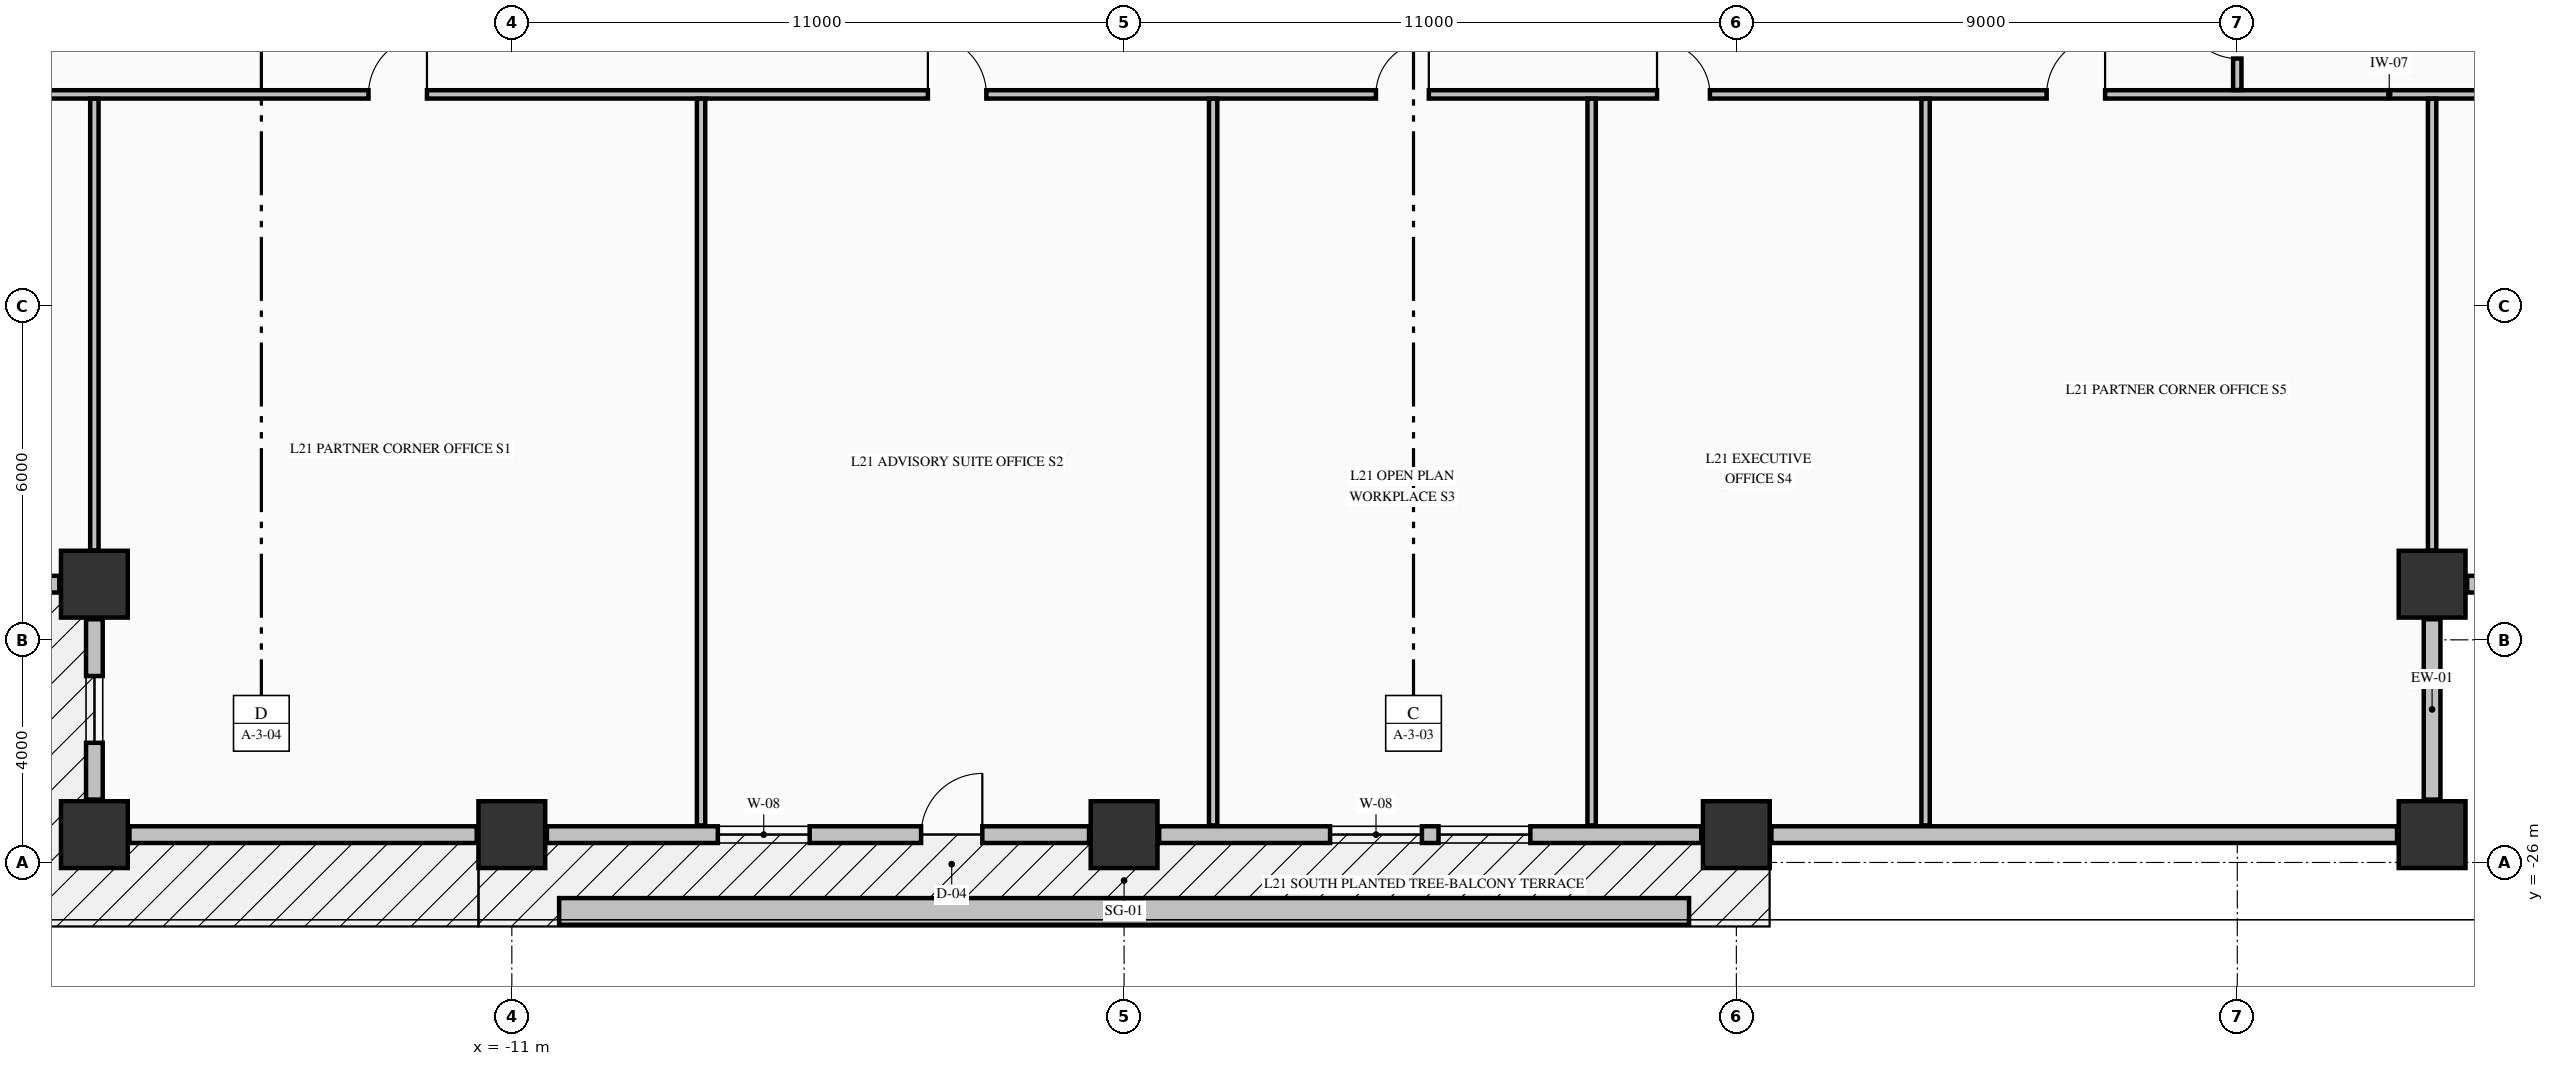
"""IFC4 building model, lengths in metres.
Left out: names, types, materials, properties, quantities, classifications, styles, units other than length and angle.
Written with IfcOpenShell. Run it as: python <this file> out.ifc"""

import sys

from ifc_helpers import new_model, si_unit, direction, frame, frame_2d, origin, origin_2d, place, context, subcontext, project, spatial, rectangle, extrude, element, fill, save


model = new_model("IFC4")
c1 = context("Model", 3, precision=1e-05, world=origin(), true_north=direction((0.0, 1.0)))
c2 = subcontext(c1, "Body", "Model", "MODEL_VIEW")
j1 = project(units=[si_unit("LENGTHUNIT", "METRE"), si_unit("PLANEANGLEUNIT", "RADIAN")], contexts=[c1])
p1 = place(None, origin())
s1 = spatial("IfcSite", under=j1, at=p1, CompositionType="ELEMENT")
p2 = place(p1, origin())
s2 = spatial("IfcBuilding", under=s1, at=p2, CompositionType="ELEMENT")
p3 = place(p2, frame((0.0, 0.0, 86.94)))
s3 = spatial("IfcBuildingStorey", under=s2, at=p3, CompositionType="ELEMENT", Elevation=86.94)
for number, where, z_axis, x_axis in (
    (1, (-18.5, -25.5, -0.425), (0.0, 0.0, 1.0), (1.0, 0.0, 0.0)),
    (2, (-11.0, -25.5, -0.425), (0.0, 0.0, 1.0), (1.0, 0.0, 0.0)),
    (3, (0.0, -25.5, -0.425), (0.0, 0.0, 1.0), (1.0, 0.0, 0.0)),
    (4, (11.0, -25.5, -0.425), (0.0, 0.0, 1.0), (1.0, 0.0, 0.0)),
    (5, (23.5, -25.5, -0.425), (0.0, 0.0, 1.0), (1.0, 0.0, 0.0)),
    (6, (-18.5, -21.0, -0.425), (0.0, 0.0, 1.0), (1.0, 0.0, 0.0)),
    (7, (23.5, -21.0, -0.425), (0.0, 0.0, 1.0), (1.0, 0.0, 0.0)),
):
    element("IfcColumn", number, at=place(p3, frame(where, z_axis=z_axis, x_axis=x_axis)), inside=s3, PredefinedType="COLUMN", context=c2, shape_type="SweptSolid", body=[
        extrude(rectangle(XDim=1.2, YDim=1.2, at=origin_2d()), origin(), (0.0, 0.0, 1.0), 4.595),
    ])
for number, where, z_axis, x_axis in (
    (8, (23.5, -24.87, 0.0), (0.0, 0.0, 1.0), (0.0, 1.0, 0.0)),
    (9, (24.13, -21.0, 0.0), (0.0, 0.0, 1.0), (1.0, 0.0, 0.0)),
):
    element("IfcWall", number, at=place(p3, frame(where, z_axis=z_axis, x_axis=x_axis)), inside=s3, PredefinedType="STANDARD", context=c2, shape_type="SweptSolid", body=[
        extrude(rectangle(XDim=3.24, YDim=0.3, at=frame_2d((1.62, 0.0))), origin(), (0.0, 0.0, 1.0), 2.362),
    ])
p4 = place(p3, frame((-22.37, -21.0, 0.0), z_axis=(0.0, 0.0, 1.0), x_axis=(1.0, 0.0, 0.0)))
e10 = element("IfcWall", 10, at=p4, inside=s3, PredefinedType="STANDARD", context=c2, shape_type="SweptSolid", body=[
    extrude(rectangle(XDim=3.24, YDim=0.3, at=frame_2d((1.62, 0.0))), origin(), (0.0, 0.0, 1.0), 3.562),
])
p5 = place(p4, frame((1.02, 0.0, 0.82)))
e11 = element("IfcOpeningElement", 11, at=p5, cuts=e10, PredefinedType="OPENING", context=c2, shape_type="SweptSolid", body=[
    extrude(rectangle(XDim=1.2, YDim=1.65, at=frame_2d((0.6, 0.825))), frame((0.0, 0.16, 0.0), z_axis=(0.0, -1.0, 0.0), x_axis=(1.0, 0.0, 0.0)), (0.0, 0.0, 1.0), 0.32),
])
p6 = place(p3, frame((-18.5, -21.63, 0.0), z_axis=(0.0, 0.0, 1.0), x_axis=(0.0, -1.0, 0.0)))
e12 = element("IfcWall", 12, at=p6, inside=s3, PredefinedType="STANDARD", context=c2, shape_type="SweptSolid", body=[
    extrude(rectangle(XDim=3.24, YDim=0.3, at=frame_2d((1.62, 0.0))), origin(), (0.0, 0.0, 1.0), 3.562),
])
p7 = place(p6, frame((1.02, 0.0, 0.82)))
e13 = element("IfcOpeningElement", 13, at=p7, cuts=e12, PredefinedType="OPENING", context=c2, shape_type="SweptSolid", body=[
    extrude(rectangle(XDim=1.2, YDim=1.65, at=frame_2d((0.6, 0.825))), frame((0.0, 0.16, 0.0), z_axis=(0.0, -1.0, 0.0), x_axis=(1.0, 0.0, 0.0)), (0.0, 0.0, 1.0), 0.32),
])
p8 = place(p3, frame((-17.87, -25.5, 0.0), z_axis=(0.0, 0.0, 1.0), x_axis=(1.0, 0.0, 0.0)))
e14 = element("IfcWall", 14, at=p8, inside=s3, PredefinedType="STANDARD", context=c2, shape_type="SweptSolid", body=[
    extrude(rectangle(XDim=6.24, YDim=0.3, at=frame_2d((3.12, 0.0))), origin(), (0.0, 0.0, 1.0), 3.562),
])
p9 = place(p3, frame((-10.37, -25.5, 0.0), z_axis=(0.0, 0.0, 1.0), x_axis=(1.0, 0.0, 0.0)))
e15 = element("IfcWall", 15, at=p9, inside=s3, PredefinedType="STANDARD", context=c2, shape_type="SweptSolid", body=[
    extrude(rectangle(XDim=9.74, YDim=0.3, at=frame_2d((4.87, 0.0))), origin(), (0.0, 0.0, 1.0), 3.562),
])
p10 = place(p9, frame((6.723, 0.0, 0.0)))
e16 = element("IfcOpeningElement", 16, at=p10, cuts=e15, PredefinedType="OPENING", context=c2, shape_type="SweptSolid", body=[
    extrude(rectangle(XDim=1.1, YDim=2.15, at=frame_2d((0.55, 1.075))), frame((0.0, 0.16, 0.0), z_axis=(0.0, -1.0, 0.0), x_axis=(1.0, 0.0, 0.0)), (0.0, 0.0, 1.0), 0.32),
])
p11 = place(p9, frame((3.071, 0.0, 0.8)))
e17 = element("IfcOpeningElement", 17, at=p11, cuts=e15, PredefinedType="OPENING", context=c2, shape_type="SweptSolid", body=[
    extrude(rectangle(XDim=1.65, YDim=1.7, at=frame_2d((0.825, 0.85))), frame((0.0, 0.16, 0.0), z_axis=(0.0, -1.0, 0.0), x_axis=(1.0, 0.0, 0.0)), (0.0, 0.0, 1.0), 0.32),
])
p12 = place(p3, frame((0.63, -25.5, 0.0), z_axis=(0.0, 0.0, 1.0), x_axis=(1.0, 0.0, 0.0)))
e18 = element("IfcWall", 18, at=p12, inside=s3, PredefinedType="STANDARD", context=c2, shape_type="SweptSolid", body=[
    extrude(rectangle(XDim=9.74, YDim=0.3, at=frame_2d((4.87, 0.0))), origin(), (0.0, 0.0, 1.0), 3.562),
])
p13 = place(p12, frame((3.071, 0.0, 0.8)))
e19 = element("IfcOpeningElement", 19, at=p13, cuts=e18, PredefinedType="OPENING", context=c2, shape_type="SweptSolid", body=[
    extrude(rectangle(XDim=1.65, YDim=1.7, at=frame_2d((0.825, 0.85))), frame((0.0, 0.16, 0.0), z_axis=(0.0, -1.0, 0.0), x_axis=(1.0, 0.0, 0.0)), (0.0, 0.0, 1.0), 0.32),
])
p14 = place(p12, frame((5.019, 0.0, 0.8)))
e20 = element("IfcOpeningElement", 20, at=p14, cuts=e18, PredefinedType="OPENING", context=c2, shape_type="SweptSolid", body=[
    extrude(rectangle(XDim=1.65, YDim=1.7, at=frame_2d((0.825, 0.85))), frame((0.0, 0.16, 0.0), z_axis=(0.0, -1.0, 0.0), x_axis=(1.0, 0.0, 0.0)), (0.0, 0.0, 1.0), 0.32),
])
p15 = place(p3, frame((11.63, -25.5, 0.0), z_axis=(0.0, 0.0, 1.0), x_axis=(1.0, 0.0, 0.0)))
e21 = element("IfcWall", 21, at=p15, inside=s3, PredefinedType="STANDARD", context=c2, shape_type="SweptSolid", body=[
    extrude(rectangle(XDim=11.24, YDim=0.3, at=frame_2d((5.62, 0.0))), origin(), (0.0, 0.0, 1.0), 1.962),
])
p16 = place(p3, frame((-22.835, -12.2, 0.0), z_axis=(0.0, 0.0, 1.0), x_axis=(1.0, 0.0, 0.0)))
e22 = element("IfcWall", 22, at=p16, inside=s3, PredefinedType="PARTITIONING", context=c2, shape_type="SweptSolid", body=[
    extrude(rectangle(XDim=50.67, YDim=0.15, at=frame_2d((25.335, 0.0))), origin(), (0.0, 0.0, 1.0), 4.17),
])
p17 = place(p16, frame((9.26, 0.0, 0.0)))
e23 = element("IfcOpeningElement", 23, at=p17, cuts=e22, PredefinedType="OPENING", context=c2, shape_type="SweptSolid", body=[
    extrude(rectangle(XDim=1.05, YDim=2.15, at=frame_2d((0.525, 1.075))), frame((0.0, 0.085, 0.0), z_axis=(0.0, -1.0, 0.0), x_axis=(1.0, 0.0, 0.0)), (0.0, 0.0, 1.0), 0.17),
])
p18 = place(p16, frame((19.31, 0.0, 0.0)))
e24 = element("IfcOpeningElement", 24, at=p18, cuts=e22, PredefinedType="OPENING", context=c2, shape_type="SweptSolid", body=[
    extrude(rectangle(XDim=1.05, YDim=2.15, at=frame_2d((0.525, 1.075))), frame((0.0, 0.085, 0.0), z_axis=(0.0, -1.0, 0.0), x_axis=(1.0, 0.0, 0.0)), (0.0, 0.0, 1.0), 0.17),
])
p19 = place(p16, frame((27.36, 0.0, 0.0)))
e25 = element("IfcOpeningElement", 25, at=p19, cuts=e22, PredefinedType="OPENING", context=c2, shape_type="SweptSolid", body=[
    extrude(rectangle(XDim=0.95, YDim=2.15, at=frame_2d((0.475, 1.075))), frame((0.0, 0.085, 0.0), z_axis=(0.0, -1.0, 0.0), x_axis=(1.0, 0.0, 0.0)), (0.0, 0.0, 1.0), 0.17),
])
p20 = place(p16, frame((32.41, 0.0, 0.0)))
e26 = element("IfcOpeningElement", 26, at=p20, cuts=e22, PredefinedType="OPENING", context=c2, shape_type="SweptSolid", body=[
    extrude(rectangle(XDim=0.95, YDim=2.15, at=frame_2d((0.475, 1.075))), frame((0.0, 0.085, 0.0), z_axis=(0.0, -1.0, 0.0), x_axis=(1.0, 0.0, 0.0)), (0.0, 0.0, 1.0), 0.17),
])
p21 = place(p16, frame((39.41, 0.0, 0.0)))
e27 = element("IfcOpeningElement", 27, at=p21, cuts=e22, PredefinedType="OPENING", context=c2, shape_type="SweptSolid", body=[
    extrude(rectangle(XDim=1.05, YDim=2.15, at=frame_2d((0.525, 1.075))), frame((0.0, 0.085, 0.0), z_axis=(0.0, -1.0, 0.0), x_axis=(1.0, 0.0, 0.0)), (0.0, 0.0, 1.0), 0.17),
])
p22 = place(p3, frame((-18.5, -20.394, 0.0), z_axis=(0.0, 0.0, 1.0), x_axis=(0.0, 1.0, 0.0)))
e28 = element("IfcWall", 28, at=p22, inside=s3, PredefinedType="PARTITIONING", context=c2, shape_type="SweptSolid", body=[
    extrude(rectangle(XDim=8.116, YDim=0.15, at=frame_2d((4.058, 0.0))), origin(), (0.0, 0.0, 1.0), 4.17),
])
for number, where, z_axis, x_axis in (
    (29, (-7.6, -25.335, 0.0), (0.0, 0.0, 1.0), (0.0, 1.0, 0.0)),
    (30, (1.6, -25.335, 0.0), (0.0, 0.0, 1.0), (0.0, 1.0, 0.0)),
    (31, (8.4, -25.335, 0.0), (0.0, 0.0, 1.0), (0.0, 1.0, 0.0)),
    (32, (14.4, -25.335, 0.0), (0.0, 0.0, 1.0), (0.0, 1.0, 0.0)),
):
    element("IfcWall", number, at=place(p3, frame(where, z_axis=z_axis, x_axis=x_axis)), inside=s3, PredefinedType="PARTITIONING", context=c2, shape_type="SweptSolid", body=[
        extrude(rectangle(XDim=13.057, YDim=0.15, at=frame_2d((6.528, 0.0))), origin(), (0.0, 0.0, 1.0), 4.17),
    ])
p23 = place(p3, frame((20.0, -12.122, 0.0), z_axis=(0.0, 0.0, 1.0), x_axis=(0.0, 1.0, 0.0)))
e33 = element("IfcWall", 33, at=p23, inside=s3, PredefinedType="PARTITIONING", context=c2, shape_type="SweptSolid", body=[
    extrude(rectangle(XDim=1.666, YDim=0.15, at=frame_2d((0.833, 0.0))), origin(), (0.0, 0.0, 1.0), 3.36),
])
p24 = place(p23, frame((0.566, 0.0, 0.0)))
e34 = element("IfcOpeningElement", 34, at=p24, cuts=e33, PredefinedType="OPENING", context=c2, shape_type="SweptSolid", body=[
    extrude(rectangle(XDim=0.95, YDim=2.15, at=frame_2d((0.475, 1.075))), frame((0.0, 0.085, 0.0), z_axis=(0.0, -1.0, 0.0), x_axis=(1.0, 0.0, 0.0)), (0.0, 0.0, 1.0), 0.17),
])
p25 = place(p3, frame((23.5, -20.394, 0.0), z_axis=(0.0, 0.0, 1.0), x_axis=(0.0, 1.0, 0.0)))
e35 = element("IfcWall", 35, at=p25, inside=s3, PredefinedType="PARTITIONING", context=c2, shape_type="SweptSolid", body=[
    extrude(rectangle(XDim=8.116, YDim=0.15, at=frame_2d((4.058, 0.0))), origin(), (0.0, 0.0, 1.0), 4.17),
])
p26 = place(p3, frame((-10.15, -26.88, -0.04), z_axis=(0.0, 0.0, 1.0), x_axis=(1.0, 0.0, 0.0)))
e36 = element("IfcWall", 36, at=p26, inside=s3, PredefinedType="PARAPET", context=c2, shape_type="SweptSolid", body=[
    extrude(rectangle(XDim=20.3, YDim=0.48, at=frame_2d((10.15, 0.0))), origin(), (0.0, 0.0, 1.0), 0.52),
])
p27 = place(p7, origin())
e37 = element("IfcWindow", 37, at=p27, inside=s3, PartitioningType="SINGLE_PANEL", PredefinedType="WINDOW", context=c2, shape_type="SweptSolid", body=[
    extrude(rectangle(XDim=1.2, YDim=1.65, at=frame_2d((0.6, 0.825))), frame((0.0, 0.03, 0.0), z_axis=(0.0, -1.0, 0.0), x_axis=(1.0, 0.0, 0.0)), (0.0, 0.0, 1.0), 0.06),
])
fill(e13, e37)
p28 = place(p10, origin())
e38 = element("IfcDoor", 38, at=p28, inside=s3, OperationType="SINGLE_SWING_RIGHT", PredefinedType="DOOR", context=c2, shape_type="SweptSolid", body=[
    extrude(rectangle(XDim=1.1, YDim=2.15, at=frame_2d((0.55, 1.075))), frame((0.0, 0.025, 0.0), z_axis=(0.0, -1.0, 0.0), x_axis=(1.0, 0.0, 0.0)), (0.0, 0.0, 1.0), 0.05),
])
fill(e16, e38)
p29 = place(p11, origin())
e39 = element("IfcWindow", 39, at=p29, inside=s3, PartitioningType="SINGLE_PANEL", PredefinedType="WINDOW", context=c2, shape_type="SweptSolid", body=[
    extrude(rectangle(XDim=1.65, YDim=1.7, at=frame_2d((0.825, 0.85))), frame((0.0, 0.03, 0.0), z_axis=(0.0, -1.0, 0.0), x_axis=(1.0, 0.0, 0.0)), (0.0, 0.0, 1.0), 0.06),
])
fill(e17, e39)
p30 = place(p13, origin())
e40 = element("IfcWindow", 40, at=p30, inside=s3, PartitioningType="SINGLE_PANEL", PredefinedType="WINDOW", context=c2, shape_type="SweptSolid", body=[
    extrude(rectangle(XDim=1.65, YDim=1.7, at=frame_2d((0.825, 0.85))), frame((0.0, 0.03, 0.0), z_axis=(0.0, -1.0, 0.0), x_axis=(1.0, 0.0, 0.0)), (0.0, 0.0, 1.0), 0.06),
])
fill(e19, e40)
p31 = place(p14, origin())
e41 = element("IfcWindow", 41, at=p31, inside=s3, PartitioningType="SINGLE_PANEL", PredefinedType="WINDOW", context=c2, shape_type="SweptSolid", body=[
    extrude(rectangle(XDim=1.65, YDim=1.7, at=frame_2d((0.825, 0.85))), frame((0.0, 0.03, 0.0), z_axis=(0.0, -1.0, 0.0), x_axis=(1.0, 0.0, 0.0)), (0.0, 0.0, 1.0), 0.06),
])
fill(e20, e41)
p32 = place(p17, origin())
e42 = element("IfcDoor", 42, at=p32, inside=s3, OperationType="SINGLE_SWING_RIGHT", PredefinedType="DOOR", context=c2, shape_type="SweptSolid", body=[
    extrude(rectangle(XDim=1.05, YDim=2.15, at=frame_2d((0.525, 1.075))), frame((0.0, 0.025, 0.0), z_axis=(0.0, -1.0, 0.0), x_axis=(1.0, 0.0, 0.0)), (0.0, 0.0, 1.0), 0.05),
])
fill(e23, e42)
p33 = place(p18, origin())
e43 = element("IfcDoor", 43, at=p33, inside=s3, OperationType="SINGLE_SWING_LEFT", PredefinedType="DOOR", context=c2, shape_type="SweptSolid", body=[
    extrude(rectangle(XDim=1.05, YDim=2.15, at=frame_2d((0.525, 1.075))), frame((0.0, 0.025, 0.0), z_axis=(0.0, -1.0, 0.0), x_axis=(1.0, 0.0, 0.0)), (0.0, 0.0, 1.0), 0.05),
])
fill(e24, e43)
p34 = place(p19, origin())
e44 = element("IfcDoor", 44, at=p34, inside=s3, OperationType="SINGLE_SWING_RIGHT", PredefinedType="DOOR", context=c2, shape_type="SweptSolid", body=[
    extrude(rectangle(XDim=0.95, YDim=2.15, at=frame_2d((0.475, 1.075))), frame((0.0, 0.025, 0.0), z_axis=(0.0, -1.0, 0.0), x_axis=(1.0, 0.0, 0.0)), (0.0, 0.0, 1.0), 0.05),
])
fill(e25, e44)
p35 = place(p20, origin())
e45 = element("IfcDoor", 45, at=p35, inside=s3, OperationType="SINGLE_SWING_LEFT", PredefinedType="DOOR", context=c2, shape_type="SweptSolid", body=[
    extrude(rectangle(XDim=0.95, YDim=2.15, at=frame_2d((0.475, 1.075))), frame((0.0, 0.025, 0.0), z_axis=(0.0, -1.0, 0.0), x_axis=(1.0, 0.0, 0.0)), (0.0, 0.0, 1.0), 0.05),
])
fill(e26, e45)
p36 = place(p21, origin())
e46 = element("IfcDoor", 46, at=p36, inside=s3, OperationType="SINGLE_SWING_RIGHT", PredefinedType="DOOR", context=c2, shape_type="SweptSolid", body=[
    extrude(rectangle(XDim=1.05, YDim=2.15, at=frame_2d((0.525, 1.075))), frame((0.0, 0.025, 0.0), z_axis=(0.0, -1.0, 0.0), x_axis=(1.0, 0.0, 0.0)), (0.0, 0.0, 1.0), 0.05),
])
fill(e27, e46)
p37 = place(p24, origin())
e47 = element("IfcDoor", 47, at=p37, inside=s3, OperationType="SINGLE_SWING_RIGHT", PredefinedType="DOOR", context=c2, shape_type="SweptSolid", body=[
    extrude(rectangle(XDim=0.95, YDim=2.15, at=frame_2d((0.475, 1.075))), frame((0.0, 0.025, 0.0), z_axis=(0.0, -1.0, 0.0), x_axis=(1.0, 0.0, 0.0)), (0.0, 0.0, 1.0), 0.05),
])
fill(e34, e47)
save(model, sys.argv[1])
